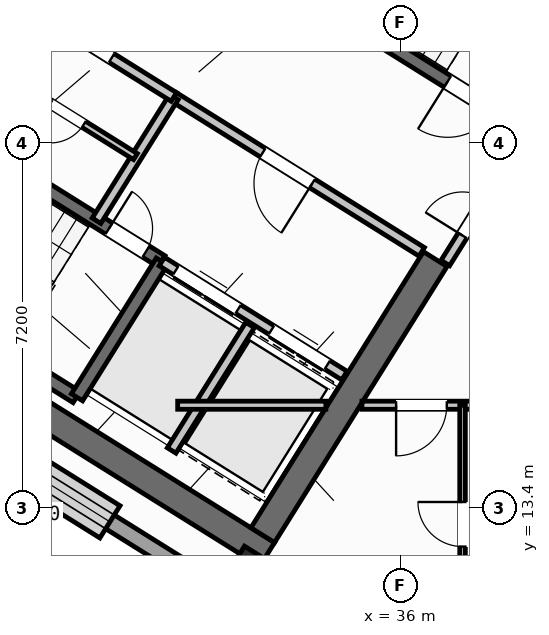
"""IFC4 building model, lengths in metres.
Left out: names, types, materials, properties, quantities, classifications, styles, units other than length and angle.
Written with IfcOpenShell. Run it as: python <this file> out.ifc"""

import sys

from ifc_helpers import new_model, si_unit, direction, frame, frame_2d, origin, origin_2d, place, context, subcontext, project, spatial, rectangle, hollow_rectangle, extrude, source, transform, mapped, element, fill, save


model = new_model("IFC4")
c1 = context("Model", 3, precision=1e-05, world=origin(), true_north=direction((0.0, 1.0)))
c2 = subcontext(c1, "Body", "Model", "MODEL_VIEW")
j1 = project(units=[si_unit("LENGTHUNIT", "METRE"), si_unit("PLANEANGLEUNIT", "RADIAN")], contexts=[c1])
p1 = place(None, origin())
s1 = spatial("IfcSite", under=j1, at=p1, CompositionType="ELEMENT")
p2 = place(p1, origin())
s2 = spatial("IfcBuilding", under=s1, at=p2, CompositionType="ELEMENT")
p3 = place(p2, frame((0.0, 0.0, 195.0)))
s3 = spatial("IfcBuildingStorey", under=s2, at=p3, CompositionType="ELEMENT", Elevation=195.0)
p4 = place(p3, frame((33.366, 12.477, 0.0), z_axis=(0.0, 0.0, 1.0), x_axis=(-0.848047359947, 0.529920442413, 0.0)))
e1 = element("IfcWall", 1, at=p4, inside=s3, PredefinedType="SHEAR", context=c2, shape_type="SweptSolid", body=[
    extrude(rectangle(XDim=13.14, YDim=0.55, at=frame_2d((6.57, 0.0))), origin(), (0.0, 0.0, 1.0), 4.22),
])
p5 = place(p3, frame((36.683, 18.304, 0.0), z_axis=(0.0, 0.0, 1.0), x_axis=(-0.529896466841, -0.848062341122, 0.0)))
e2 = element("IfcWall", 2, at=p5, inside=s3, PredefinedType="SHEAR", context=c2, shape_type="SweptSolid", body=[
    extrude(rectangle(XDim=6.425, YDim=0.55, at=frame_2d((3.212, 0.0))), origin(), (0.0, 0.0, 1.0), 4.22),
])
m1 = source(origin(), c2, "Body", "SweptSolid", [
    extrude(hollow_rectangle(XDim=0.8, YDim=0.8, WallThickness=0.032, at=origin_2d()), origin(), (0.0, 0.0, 1.0), 4.5),
])
p6 = place(p3, frame((33.046, 12.087, 0.0), z_axis=(0.0, 0.0, 1.0), x_axis=(-0.848048096156, 0.529919264233, 0.0)))
e3 = element("IfcColumn", 3, at=p6, inside=s3, PredefinedType="COLUMN", context=c2, shape_type="MappedRepresentation", body=[
    mapped(m1, transform((0.0, 0.0, 0.0), scale=1.0)),
])
p7 = place(p3, frame((31.76, 12.183, 0.0), z_axis=(0.0, 0.0, 1.0), x_axis=(-0.848047074256, 0.529920899612, 0.0)))
e4 = element("IfcWall", 4, at=p7, inside=s3, PredefinedType="STANDARD", context=c2, shape_type="SweptSolid", body=[
    extrude(rectangle(XDim=30.652, YDim=0.32, at=frame_2d((15.326, 0.0))), origin(), (0.0, 0.0, 1.0), 4.22),
])
p8 = place(p7, frame((15.166, 0.0, 0.0)))
e5 = element("IfcOpeningElement", 5, at=p8, cuts=e4, PredefinedType="OPENING", context=c2, shape_type="SweptSolid", body=[
    extrude(rectangle(XDim=1.2, YDim=2.15, at=frame_2d((0.6, 1.075))), frame((0.0, 0.17, 0.0), z_axis=(0.0, -1.0, 0.0), x_axis=(1.0, 0.0, 0.0)), (0.0, 0.0, 1.0), 0.34),
])
p9 = place(p7, frame((1.765, 0.0, 0.7)))
e6 = element("IfcOpeningElement", 6, at=p9, cuts=e4, PredefinedType="OPENING", context=c2, shape_type="SweptSolid", body=[
    extrude(rectangle(XDim=2.6, YDim=2.0, at=frame_2d((1.3, 1.0))), frame((0.0, 0.17, 0.0), z_axis=(0.0, -1.0, 0.0), x_axis=(1.0, 0.0, 0.0)), (0.0, 0.0, 1.0), 0.34),
])
p10 = place(p7, frame((6.994, 0.0, 0.7)))
e7 = element("IfcOpeningElement", 7, at=p10, cuts=e4, PredefinedType="OPENING", context=c2, shape_type="SweptSolid", body=[
    extrude(rectangle(XDim=2.6, YDim=2.0, at=frame_2d((1.3, 1.0))), frame((0.0, 0.17, 0.0), z_axis=(0.0, -1.0, 0.0), x_axis=(1.0, 0.0, 0.0)), (0.0, 0.0, 1.0), 0.34),
])
p11 = place(p7, frame((19.101, 0.0, 0.85)))
e8 = element("IfcOpeningElement", 8, at=p11, cuts=e4, PredefinedType="OPENING", context=c2, shape_type="SweptSolid", body=[
    extrude(rectangle(XDim=1.6, YDim=1.8, at=frame_2d((0.8, 0.9))), frame((0.0, 0.17, 0.0), z_axis=(0.0, -1.0, 0.0), x_axis=(1.0, 0.0, 0.0)), (0.0, 0.0, 1.0), 0.34),
])
p12 = place(p7, frame((26.358, 0.0, 0.7)))
e9 = element("IfcOpeningElement", 9, at=p12, cuts=e4, PredefinedType="OPENING", context=c2, shape_type="SweptSolid", body=[
    extrude(rectangle(XDim=2.6, YDim=2.0, at=frame_2d((1.3, 1.0))), frame((0.0, 0.17, 0.0), z_axis=(0.0, -1.0, 0.0), x_axis=(1.0, 0.0, 0.0)), (0.0, 0.0, 1.0), 0.34),
])
p13 = place(p3, frame((29.605, 15.581, 0.0), z_axis=(0.0, 0.0, 1.0), x_axis=(-0.848036911448, 0.529937163087, 0.0)))
e10 = element("IfcWall", 10, at=p13, inside=s3, PredefinedType="SHEAR", context=c2, shape_type="SweptSolid", body=[
    extrude(rectangle(XDim=7.46, YDim=0.26, at=frame_2d((3.73, 0.0))), origin(), (0.0, 0.0, 1.0), 4.22),
])
p14 = place(p3, frame((31.28, 18.261, 0.0), z_axis=(0.0, 0.0, 1.0), x_axis=(-0.848051618787, 0.529913626805, 0.0)))
e11 = element("IfcWall", 11, at=p14, inside=s3, PredefinedType="SHEAR", context=c2, shape_type="SweptSolid", body=[
    extrude(rectangle(XDim=7.46, YDim=0.26, at=frame_2d((3.73, 0.0))), origin(), (0.0, 0.0, 1.0), 4.22),
])
p15 = place(p14, frame((0.36, 0.0, 0.0)))
e12 = element("IfcOpeningElement", 12, at=p15, cuts=e11, PredefinedType="OPENING", context=c2, shape_type="SweptSolid", body=[
    extrude(rectangle(XDim=0.86, YDim=2.05, at=frame_2d((0.43, 1.025))), frame((0.0, 0.14, 0.0), z_axis=(0.0, -1.0, 0.0), x_axis=(1.0, 0.0, 0.0)), (0.0, 0.0, 1.0), 0.28),
])
p16 = place(p3, frame((31.288, 18.256, 0.0), z_axis=(0.0, 0.0, 1.0), x_axis=(-0.529943379326, -0.848033026897, 0.0)))
e13 = element("IfcWall", 13, at=p16, inside=s3, PredefinedType="SHEAR", context=c2, shape_type="SweptSolid", body=[
    extrude(rectangle(XDim=3.16, YDim=0.26, at=frame_2d((1.58, 0.0))), origin(), (0.0, 0.0, 1.0), 4.22),
])
p17 = place(p3, frame((38.046, 21.108, 0.0), z_axis=(0.0, 0.0, 1.0), x_axis=(-0.848054434086, 0.529909121291, 0.0)))
e14 = element("IfcWall", 14, at=p17, inside=s3, PredefinedType="SHEAR", context=c2, shape_type="SweptSolid", body=[
    extrude(rectangle(XDim=7.33, YDim=0.26, at=frame_2d((3.665, 0.0))), origin(), (0.0, 0.0, 1.0), 4.22),
])
p18 = place(p17, frame((0.22, 0.0, 0.0)))
e15 = element("IfcOpeningElement", 15, at=p18, cuts=e14, PredefinedType="OPENING", context=c2, shape_type="SweptSolid", body=[
    extrude(rectangle(XDim=1.1, YDim=2.1, at=frame_2d((0.55, 1.05))), frame((0.0, 0.14, 0.0), z_axis=(0.0, -1.0, 0.0), x_axis=(1.0, 0.0, 0.0)), (0.0, 0.0, 1.0), 0.28),
])
p19 = place(p3, frame((34.891, 16.005, 0.0), z_axis=(0.0, 0.0, 1.0), x_axis=(-0.848062873452, 0.529895614884, 0.0)))
e16 = element("IfcWall", 16, at=p19, inside=s3, PredefinedType="STANDARD", context=c2, shape_type="SweptSolid", body=[
    extrude(rectangle(XDim=4.248, YDim=0.2, at=frame_2d((2.124, 0.0))), origin(), (0.0, 0.0, 1.0), 4.21),
])
p20 = place(p19, frame((0.398, 0.0, 0.0)))
e17 = element("IfcOpeningElement", 17, at=p20, cuts=e16, PredefinedType="OPENING", context=c2, shape_type="SweptSolid", body=[
    extrude(rectangle(XDim=1.3, YDim=2.2, at=frame_2d((0.65, 1.1))), frame((0.0, 0.11, 0.0), z_axis=(0.0, -1.0, 0.0), x_axis=(1.0, 0.0, 0.0)), (0.0, 0.0, 1.0), 0.22),
])
p21 = place(p19, frame((2.473, 0.0, 0.0)))
e18 = element("IfcOpeningElement", 18, at=p21, cuts=e16, PredefinedType="OPENING", context=c2, shape_type="SweptSolid", body=[
    extrude(rectangle(XDim=1.45, YDim=2.25, at=frame_2d((0.725, 1.125))), frame((0.0, 0.11, 0.0), z_axis=(0.0, -1.0, 0.0), x_axis=(1.0, 0.0, 0.0)), (0.0, 0.0, 1.0), 0.22),
])
p22 = place(p3, frame((36.417, 18.447, 0.0), z_axis=(0.0, 0.0, 1.0), x_axis=(-0.848064879198, 0.529892404805, 0.0)))
e19 = element("IfcWall", 19, at=p22, inside=s3, PredefinedType="STANDARD", context=c2, shape_type="SweptSolid", body=[
    extrude(rectangle(XDim=5.768, YDim=0.2, at=frame_2d((2.884, 0.0))), origin(), (0.0, 0.0, 1.0), 4.21),
])
p23 = place(p22, frame((2.548, 0.0, 0.0)))
e20 = element("IfcOpeningElement", 20, at=p23, cuts=e19, PredefinedType="OPENING", context=c2, shape_type="SweptSolid", body=[
    extrude(rectangle(XDim=1.15, YDim=2.1, at=frame_2d((0.575, 1.05))), frame((0.0, 0.11, 0.0), z_axis=(0.0, -1.0, 0.0), x_axis=(1.0, 0.0, 0.0)), (0.0, 0.0, 1.0), 0.22),
])
p24 = place(p3, frame((33.029, 17.003, 0.0), z_axis=(0.0, 0.0, 1.0), x_axis=(-0.529916267533, -0.848049968695, 0.0)))
e21 = element("IfcWall", 21, at=p24, inside=s3, PredefinedType="STANDARD", context=c2, shape_type="SweptSolid", body=[
    extrude(rectangle(XDim=2.92, YDim=0.2, at=frame_2d((1.46, 0.0))), origin(), (0.0, 0.0, 1.0), 4.21),
])
p25 = place(p3, frame((31.525, 21.504, 0.0), z_axis=(0.0, 0.0, 1.0), x_axis=(-0.529907497854, -0.848055448493, 0.0)))
e22 = element("IfcWall", 22, at=p25, inside=s3, PredefinedType="STANDARD", context=c2, shape_type="SweptSolid", body=[
    extrude(rectangle(XDim=2.88, YDim=0.2, at=frame_2d((1.44, 0.0))), origin(), (0.0, 0.0, 1.0), 4.21),
])
p26 = place(p3, frame((31.525, 21.504, 0.0), z_axis=(0.0, 0.0, 1.0), x_axis=(-0.848040211232, 0.529931882541, 0.0)))
e23 = element("IfcWall", 23, at=p26, inside=s3, PredefinedType="STANDARD", context=c2, shape_type="SweptSolid", body=[
    extrude(rectangle(XDim=6.218, YDim=0.2, at=frame_2d((3.109, 0.0))), origin(), (0.0, 0.0, 1.0), 4.21),
])
p27 = place(p26, frame((4.4, 0.0, 0.0)))
e24 = element("IfcOpeningElement", 24, at=p27, cuts=e23, PredefinedType="OPENING", context=c2, shape_type="SweptSolid", body=[
    extrude(rectangle(XDim=0.86, YDim=2.05, at=frame_2d((0.43, 1.025))), frame((0.0, 0.11, 0.0), z_axis=(0.0, -1.0, 0.0), x_axis=(1.0, 0.0, 0.0)), (0.0, 0.0, 1.0), 0.22),
])
p28 = place(p26, frame((1.45, 0.0, 0.0)))
e25 = element("IfcOpeningElement", 25, at=p28, cuts=e23, PredefinedType="OPENING", context=c2, shape_type="SweptSolid", body=[
    extrude(rectangle(XDim=0.86, YDim=2.05, at=frame_2d((0.43, 1.025))), frame((0.0, 0.11, 0.0), z_axis=(0.0, -1.0, 0.0), x_axis=(1.0, 0.0, 0.0)), (0.0, 0.0, 1.0), 0.22),
])
p29 = place(p3, frame((30.766, 20.327, 0.0), z_axis=(0.0, 0.0, 1.0), x_axis=(-0.848052663127, 0.529911955482, 0.0)))
e26 = element("IfcWall", 26, at=p29, inside=s3, PredefinedType="PLUMBINGWALL", context=c2, shape_type="SweptSolid", body=[
    extrude(rectangle(XDim=3.28, YDim=0.14, at=frame_2d((1.64, 0.0))), origin(), (0.0, 0.0, 1.0), 4.21),
])
p30 = place(p29, frame((1.2, 0.0, 0.0)))
e27 = element("IfcOpeningElement", 27, at=p30, cuts=e26, PredefinedType="OPENING", context=c2, shape_type="SweptSolid", body=[
    extrude(rectangle(XDim=0.78, YDim=2.05, at=frame_2d((0.39, 1.025))), frame((0.0, 0.08, 0.0), z_axis=(0.0, -1.0, 0.0), x_axis=(1.0, 0.0, 0.0)), (0.0, 0.0, 1.0), 0.16),
])
p31 = place(p3, frame((38.451, 20.737, 0.0), z_axis=(0.0, 0.0, 1.0), x_axis=(-0.529924799939, -0.848044637038, 0.0)))
e28 = element("IfcWall", 28, at=p31, inside=s3, PredefinedType="STANDARD", context=c2, shape_type="SweptSolid", body=[
    extrude(rectangle(XDim=2.96, YDim=0.2, at=frame_2d((1.48, 0.0))), origin(), (0.0, 0.0, 1.0), 4.21),
])
p32 = place(p31, frame((1.46, 0.0, 0.0)))
e29 = element("IfcOpeningElement", 29, at=p32, cuts=e28, PredefinedType="OPENING", context=c2, shape_type="SweptSolid", body=[
    extrude(rectangle(XDim=0.86, YDim=2.05, at=frame_2d((0.43, 1.025))), frame((0.0, 0.11, 0.0), z_axis=(0.0, -1.0, 0.0), x_axis=(1.0, 0.0, 0.0)), (0.0, 0.0, 1.0), 0.22),
])
p33 = place(p3, frame((31.6, 15.42, 0.0), z_axis=(0.0, 0.0, 1.0), x_axis=(1.0, 0.0, 0.0)))
e30 = element("IfcWall", 30, at=p33, inside=s3, PredefinedType="PARTITIONING", context=c2, shape_type="SweptSolid", body=[
    extrude(rectangle(XDim=2.925, YDim=0.16, at=frame_2d((1.462, 0.0))), origin(), (0.0, 0.0, 1.0), 4.21),
])
p34 = place(p3, frame((35.237, 15.42, 0.0), z_axis=(0.0, 0.0, 1.0), x_axis=(1.0, 0.0, 0.0)))
e31 = element("IfcWall", 31, at=p34, inside=s3, PredefinedType="PARTITIONING", context=c2, shape_type="SweptSolid", body=[
    extrude(rectangle(XDim=15.432, YDim=0.16, at=frame_2d((7.716, 0.0))), origin(), (0.0, 0.0, 1.0), 4.21),
])
p35 = place(p34, frame((0.674, 0.0, 0.0)))
e32 = element("IfcOpeningElement", 32, at=p35, cuts=e31, PredefinedType="OPENING", context=c2, shape_type="SweptSolid", body=[
    extrude(rectangle(XDim=1.0, YDim=2.1, at=frame_2d((0.5, 1.05))), frame((0.0, 0.09, 0.0), z_axis=(0.0, -1.0, 0.0), x_axis=(1.0, 0.0, 0.0)), (0.0, 0.0, 1.0), 0.18),
])
p36 = place(p34, frame((9.094, 0.0, 0.0)))
e33 = element("IfcOpeningElement", 33, at=p36, cuts=e31, PredefinedType="OPENING", context=c2, shape_type="SweptSolid", body=[
    extrude(rectangle(XDim=1.0, YDim=2.1, at=frame_2d((0.5, 1.05))), frame((0.0, 0.09, 0.0), z_axis=(0.0, -1.0, 0.0), x_axis=(1.0, 0.0, 0.0)), (0.0, 0.0, 1.0), 0.18),
])
p37 = place(p3, frame((37.222, 1.96, 0.0), z_axis=(0.0, 0.0, 1.0), x_axis=(0.0, 1.0, 0.0)))
e34 = element("IfcWall", 34, at=p37, inside=s3, PredefinedType="PARTITIONING", context=c2, shape_type="SweptSolid", body=[
    extrude(rectangle(XDim=13.46, YDim=0.11, at=frame_2d((6.73, 0.0))), origin(), (0.0, 0.0, 1.0), 4.21),
])
p38 = place(p37, frame((5.2, 0.0, 0.0)))
e35 = element("IfcOpeningElement", 35, at=p38, cuts=e34, PredefinedType="OPENING", context=c2, shape_type="SweptSolid", body=[
    extrude(rectangle(XDim=0.92, YDim=2.08, at=frame_2d((0.46, 1.04))), frame((0.0, 0.065, 0.0), z_axis=(0.0, -1.0, 0.0), x_axis=(1.0, 0.0, 0.0)), (0.0, 0.0, 1.0), 0.13),
])
p39 = place(p37, frame((10.67, 0.0, 0.0)))
e36 = element("IfcOpeningElement", 36, at=p39, cuts=e34, PredefinedType="OPENING", context=c2, shape_type="SweptSolid", body=[
    extrude(rectangle(XDim=0.88, YDim=2.08, at=frame_2d((0.44, 1.04))), frame((0.0, 0.065, 0.0), z_axis=(0.0, -1.0, 0.0), x_axis=(1.0, 0.0, 0.0)), (0.0, 0.0, 1.0), 0.13),
])
m2 = source(origin(), c2, "Body", "SweptSolid", [
    extrude(rectangle(XDim=2.6, YDim=2.0, at=frame_2d((1.3, 1.0))), frame((0.0, 0.03, 0.0), z_axis=(0.0, -1.0, 0.0), x_axis=(1.0, 0.0, 0.0)), (0.0, 0.0, 1.0), 0.06),
])
p40 = place(p9, origin())
e37 = element("IfcWindow", 37, at=p40, inside=s3, PartitioningType="SINGLE_PANEL", PredefinedType="WINDOW", context=c2, shape_type="MappedRepresentation", body=[
    mapped(m2, transform((0.0, 0.0, 0.0), scale=1.0)),
])
fill(e6, e37)
m3 = source(origin(), c2, "Body", "SweptSolid", [
    extrude(rectangle(XDim=0.86, YDim=2.05, at=frame_2d((0.43, 1.025))), frame((0.0, 0.025, 0.0), z_axis=(0.0, -1.0, 0.0), x_axis=(1.0, 0.0, 0.0)), (0.0, 0.0, 1.0), 0.05),
])
p41 = place(p15, frame((0.86, 0.0, 0.0), z_axis=(0.0, 0.0, 1.0), x_axis=(-1.0, 0.0, 0.0)))
e38 = element("IfcDoor", 38, at=p41, inside=s3, OperationType="SINGLE_SWING_LEFT", PredefinedType="DOOR", context=c2, shape_type="MappedRepresentation", body=[
    mapped(m3, transform((0.0, 0.0, 0.0), scale=1.0)),
])
fill(e12, e38)
m4 = source(origin(), c2, "Body", "SweptSolid", [
    extrude(rectangle(XDim=1.1, YDim=2.1, at=frame_2d((0.55, 1.05))), frame((0.0, 0.025, 0.0), z_axis=(0.0, -1.0, 0.0), x_axis=(1.0, 0.0, 0.0)), (0.0, 0.0, 1.0), 0.05),
])
p42 = place(p18, origin())
e39 = element("IfcDoor", 39, at=p42, inside=s3, OperationType="SINGLE_SWING_RIGHT", PredefinedType="DOOR", context=c2, shape_type="MappedRepresentation", body=[
    mapped(m4, transform((0.0, 0.0, 0.0), scale=1.0)),
])
fill(e15, e39)
m5 = source(origin(), c2, "Body", "SweptSolid", [
    extrude(rectangle(XDim=1.15, YDim=2.1, at=frame_2d((0.575, 1.05))), frame((0.0, 0.025, 0.0), z_axis=(0.0, -1.0, 0.0), x_axis=(1.0, 0.0, 0.0)), (0.0, 0.0, 1.0), 0.05),
])
p43 = place(p23, origin())
e40 = element("IfcDoor", 40, at=p43, inside=s3, OperationType="SINGLE_SWING_LEFT", PredefinedType="DOOR", context=c2, shape_type="MappedRepresentation", body=[
    mapped(m5, transform((0.0, 0.0, 0.0), scale=1.0)),
])
fill(e20, e40)
m6 = source(origin(), c2, "Body", "SweptSolid", [
    extrude(rectangle(XDim=1.3, YDim=2.2, at=frame_2d((0.65, 1.1))), frame((0.0, 0.025, 0.0), z_axis=(0.0, -1.0, 0.0), x_axis=(1.0, 0.0, 0.0)), (0.0, 0.0, 1.0), 0.05),
])
p44 = place(p20, origin())
e41 = element("IfcDoor", 41, at=p44, inside=s3, OperationType="DOUBLE_DOOR_SLIDING", PredefinedType="DOOR", context=c2, shape_type="MappedRepresentation", body=[
    mapped(m6, transform((0.0, 0.0, 0.0), scale=1.0)),
])
fill(e17, e41)
m7 = source(origin(), c2, "Body", "SweptSolid", [
    extrude(rectangle(XDim=1.45, YDim=2.25, at=frame_2d((0.725, 1.125))), frame((0.0, 0.025, 0.0), z_axis=(0.0, -1.0, 0.0), x_axis=(1.0, 0.0, 0.0)), (0.0, 0.0, 1.0), 0.05),
])
p45 = place(p21, origin())
e42 = element("IfcDoor", 42, at=p45, inside=s3, OperationType="DOUBLE_DOOR_SLIDING", PredefinedType="DOOR", context=c2, shape_type="MappedRepresentation", body=[
    mapped(m7, transform((0.0, 0.0, 0.0), scale=1.0)),
])
fill(e18, e42)
p46 = place(p28, frame((0.86, 0.0, 0.0), z_axis=(0.0, 0.0, 1.0), x_axis=(-1.0, 0.0, 0.0)))
e43 = element("IfcDoor", 43, at=p46, inside=s3, OperationType="SINGLE_SWING_LEFT", PredefinedType="DOOR", context=c2, shape_type="MappedRepresentation", body=[
    mapped(m3, transform((0.0, 0.0, 0.0), scale=1.0)),
])
fill(e25, e43)
m8 = source(origin(), c2, "Body", "SweptSolid", [
    extrude(rectangle(XDim=0.78, YDim=2.05, at=frame_2d((0.39, 1.025))), frame((0.0, 0.025, 0.0), z_axis=(0.0, -1.0, 0.0), x_axis=(1.0, 0.0, 0.0)), (0.0, 0.0, 1.0), 0.05),
])
p47 = place(p30, origin())
e44 = element("IfcDoor", 44, at=p47, inside=s3, OperationType="SINGLE_SWING_RIGHT", PredefinedType="DOOR", context=c2, shape_type="MappedRepresentation", body=[
    mapped(m8, transform((0.0, 0.0, 0.0), scale=1.0)),
])
fill(e27, e44)
p48 = place(p32, frame((0.86, 0.0, 0.0), z_axis=(0.0, 0.0, 1.0), x_axis=(-1.0, 0.0, 0.0)))
e45 = element("IfcDoor", 45, at=p48, inside=s3, OperationType="SINGLE_SWING_LEFT", PredefinedType="DOOR", context=c2, shape_type="MappedRepresentation", body=[
    mapped(m3, transform((0.0, 0.0, 0.0), scale=1.0)),
])
fill(e29, e45)
m9 = source(origin(), c2, "Body", "SweptSolid", [
    extrude(rectangle(XDim=1.0, YDim=2.1, at=frame_2d((0.5, 1.05))), frame((0.0, 0.025, 0.0), z_axis=(0.0, -1.0, 0.0), x_axis=(1.0, 0.0, 0.0)), (0.0, 0.0, 1.0), 0.05),
])
p49 = place(p35, frame((1.0, 0.0, 0.0), z_axis=(0.0, 0.0, 1.0), x_axis=(-1.0, 0.0, 0.0)))
e46 = element("IfcDoor", 46, at=p49, inside=s3, OperationType="SINGLE_SWING_RIGHT", PredefinedType="DOOR", context=c2, shape_type="MappedRepresentation", body=[
    mapped(m9, transform((0.0, 0.0, 0.0), scale=1.0)),
])
fill(e32, e46)
m10 = source(origin(), c2, "Body", "SweptSolid", [
    extrude(rectangle(XDim=0.88, YDim=2.08, at=frame_2d((0.44, 1.04))), frame((0.0, 0.025, 0.0), z_axis=(0.0, -1.0, 0.0), x_axis=(1.0, 0.0, 0.0)), (0.0, 0.0, 1.0), 0.05),
])
p50 = place(p39, origin())
e47 = element("IfcDoor", 47, at=p50, inside=s3, OperationType="SINGLE_SWING_RIGHT", PredefinedType="DOOR", context=c2, shape_type="MappedRepresentation", body=[
    mapped(m10, transform((0.0, 0.0, 0.0), scale=1.0)),
])
fill(e36, e47)
save(model, sys.argv[1])
